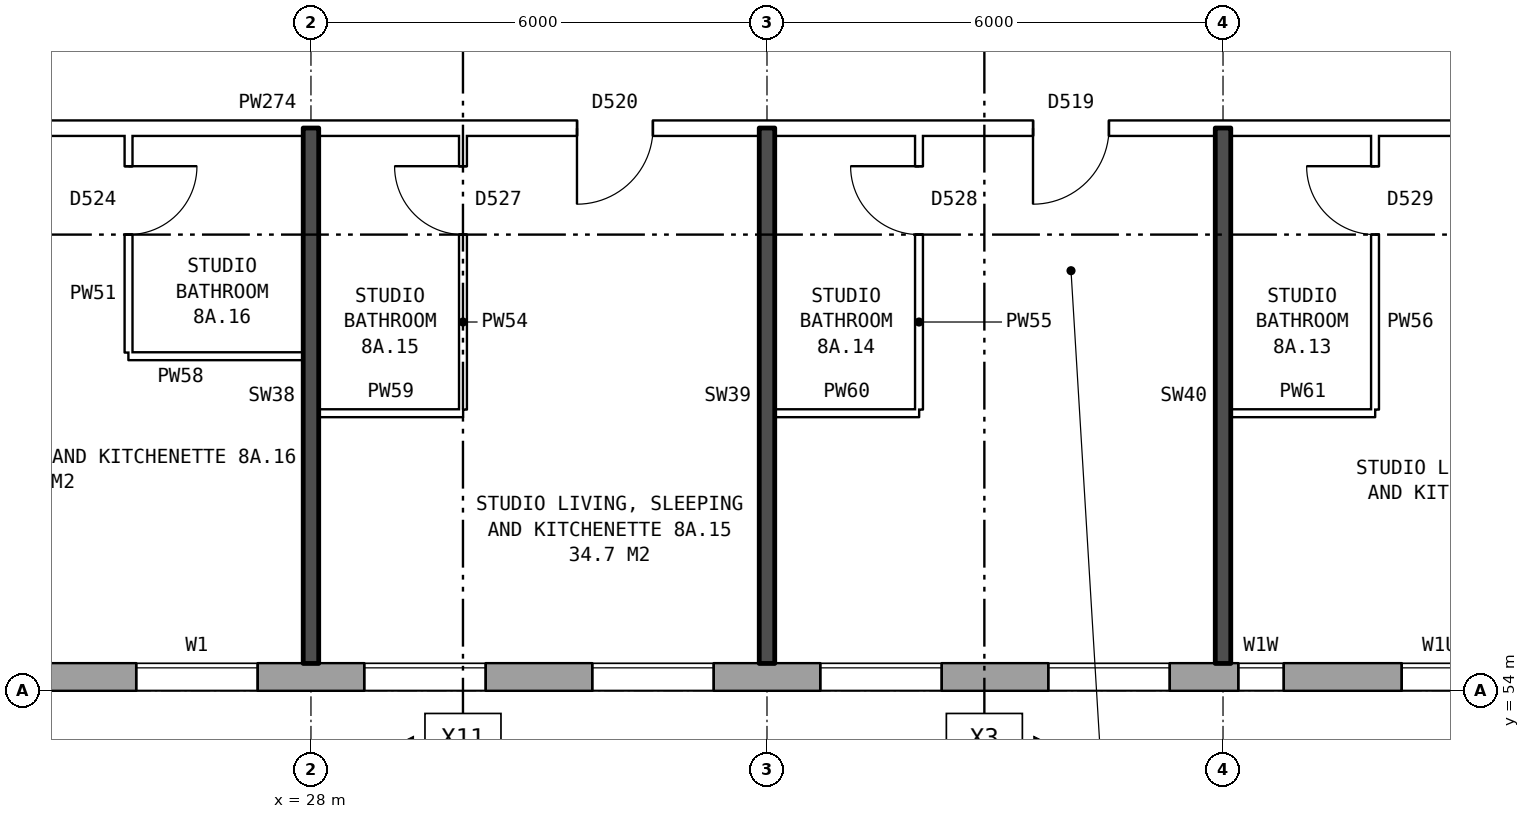
"""IFC4 building model, lengths in metres.
Left out: names, types, materials, properties, quantities, classifications, styles, units other than length and angle.
Written with IfcOpenShell. Run it as: python <this file> out.ifc"""

import sys

from ifc_helpers import new_model, si_unit, direction, frame, frame_2d, origin, place, context, subcontext, project, spatial, rectangle, extrude, element, fill, save


model = new_model("IFC4")
c1 = context("Model", 3, precision=1e-05, world=origin(), true_north=direction((0.0, 1.0)))
c2 = subcontext(c1, "Body", "Model", "MODEL_VIEW")
j1 = project(units=[si_unit("LENGTHUNIT", "METRE"), si_unit("PLANEANGLEUNIT", "RADIAN")], contexts=[c1])
p1 = place(None, origin())
s1 = spatial("IfcSite", under=j1, at=p1, CompositionType="ELEMENT")
p2 = place(p1, origin())
s2 = spatial("IfcBuilding", under=s1, at=p2, CompositionType="ELEMENT")
p3 = place(p2, frame((0.0, 0.0, 31.9)))
s3 = spatial("IfcBuildingStorey", under=s2, at=p3, CompositionType="ELEMENT", Elevation=31.9)
p4 = place(p3, frame((22.825, 54.18, 0.0), z_axis=(0.0, 0.0, 1.0), x_axis=(1.0, 0.0, 0.0)))
e1 = element("IfcWall", 1, at=p4, inside=s3, PredefinedType="STANDARD", context=c2, shape_type="SweptSolid", body=[
    extrude(rectangle(XDim=50.101, YDim=0.36, at=frame_2d((25.05, 0.0))), origin(), (0.0, 0.0, 1.0), 2.85),
])
p5 = place(p4, frame((2.875, 0.0, 0.8)))
e2 = element("IfcOpeningElement", 2, at=p5, cuts=e1, PredefinedType="OPENING", context=c2, shape_type="SweptSolid", body=[
    extrude(rectangle(XDim=1.6, YDim=1.8, at=frame_2d((0.8, 0.9))), frame((0.0, 0.19, 0.0), z_axis=(0.0, -1.0, 0.0), x_axis=(1.0, 0.0, 0.0)), (0.0, 0.0, 1.0), 0.38),
])
p6 = place(p4, frame((5.875, 0.0, 0.8)))
e3 = element("IfcOpeningElement", 3, at=p6, cuts=e1, PredefinedType="OPENING", context=c2, shape_type="SweptSolid", body=[
    extrude(rectangle(XDim=1.6, YDim=1.8, at=frame_2d((0.8, 0.9))), frame((0.0, 0.19, 0.0), z_axis=(0.0, -1.0, 0.0), x_axis=(1.0, 0.0, 0.0)), (0.0, 0.0, 1.0), 0.38),
])
p7 = place(p4, frame((8.875, 0.0, 0.8)))
e4 = element("IfcOpeningElement", 4, at=p7, cuts=e1, PredefinedType="OPENING", context=c2, shape_type="SweptSolid", body=[
    extrude(rectangle(XDim=1.6, YDim=1.8, at=frame_2d((0.8, 0.9))), frame((0.0, 0.19, 0.0), z_axis=(0.0, -1.0, 0.0), x_axis=(1.0, 0.0, 0.0)), (0.0, 0.0, 1.0), 0.38),
])
p8 = place(p4, frame((11.875, 0.0, 0.8)))
e5 = element("IfcOpeningElement", 5, at=p8, cuts=e1, PredefinedType="OPENING", context=c2, shape_type="SweptSolid", body=[
    extrude(rectangle(XDim=1.6, YDim=1.8, at=frame_2d((0.8, 0.9))), frame((0.0, 0.19, 0.0), z_axis=(0.0, -1.0, 0.0), x_axis=(1.0, 0.0, 0.0)), (0.0, 0.0, 1.0), 0.38),
])
p9 = place(p4, frame((14.875, 0.0, 0.8)))
e6 = element("IfcOpeningElement", 6, at=p9, cuts=e1, PredefinedType="OPENING", context=c2, shape_type="SweptSolid", body=[
    extrude(rectangle(XDim=1.6, YDim=1.8, at=frame_2d((0.8, 0.9))), frame((0.0, 0.19, 0.0), z_axis=(0.0, -1.0, 0.0), x_axis=(1.0, 0.0, 0.0)), (0.0, 0.0, 1.0), 0.38),
])
p10 = place(p4, frame((17.375, 0.0, 1.6)))
e7 = element("IfcOpeningElement", 7, at=p10, cuts=e1, PredefinedType="OPENING", context=c2, shape_type="SweptSolid", body=[
    extrude(rectangle(XDim=0.6, YDim=0.9, at=frame_2d((0.3, 0.45))), frame((0.0, 0.19, 0.0), z_axis=(0.0, -1.0, 0.0), x_axis=(1.0, 0.0, 0.0)), (0.0, 0.0, 1.0), 0.38),
])
p11 = place(p4, frame((20.875, 0.0, 0.8)))
e8 = element("IfcOpeningElement", 8, at=p11, cuts=e1, PredefinedType="OPENING", context=c2, shape_type="SweptSolid", body=[
    extrude(rectangle(XDim=1.6, YDim=1.8, at=frame_2d((0.8, 0.9))), frame((0.0, 0.19, 0.0), z_axis=(0.0, -1.0, 0.0), x_axis=(1.0, 0.0, 0.0)), (0.0, 0.0, 1.0), 0.38),
])
p12 = place(p4, frame((23.875, 0.0, 0.8)))
e9 = element("IfcOpeningElement", 9, at=p12, cuts=e1, PredefinedType="OPENING", context=c2, shape_type="SweptSolid", body=[
    extrude(rectangle(XDim=1.6, YDim=1.8, at=frame_2d((0.8, 0.9))), frame((0.0, 0.19, 0.0), z_axis=(0.0, -1.0, 0.0), x_axis=(1.0, 0.0, 0.0)), (0.0, 0.0, 1.0), 0.38),
])
p13 = place(p4, frame((26.875, 0.0, 0.8)))
e10 = element("IfcOpeningElement", 10, at=p13, cuts=e1, PredefinedType="OPENING", context=c2, shape_type="SweptSolid", body=[
    extrude(rectangle(XDim=1.6, YDim=1.8, at=frame_2d((0.8, 0.9))), frame((0.0, 0.19, 0.0), z_axis=(0.0, -1.0, 0.0), x_axis=(1.0, 0.0, 0.0)), (0.0, 0.0, 1.0), 0.38),
])
p14 = place(p4, frame((29.375, 0.0, 0.15)))
e11 = element("IfcOpeningElement", 11, at=p14, cuts=e1, PredefinedType="OPENING", context=c2, shape_type="SweptSolid", body=[
    extrude(rectangle(XDim=0.8, YDim=1.8, at=frame_2d((0.4, 0.9))), frame((0.0, 0.19, 0.0), z_axis=(0.0, -1.0, 0.0), x_axis=(1.0, 0.0, 0.0)), (0.0, 0.0, 1.0), 0.38),
])
p15 = place(p4, frame((32.425, 0.0, 1.4)))
e12 = element("IfcOpeningElement", 12, at=p15, cuts=e1, PredefinedType="OPENING", context=c2, shape_type="SweptSolid", body=[
    extrude(rectangle(XDim=0.6, YDim=1.2, at=frame_2d((0.3, 0.6))), frame((0.0, 0.19, 0.0), z_axis=(0.0, -1.0, 0.0), x_axis=(1.0, 0.0, 0.0)), (0.0, 0.0, 1.0), 0.38),
])
p16 = place(p4, frame((35.875, 0.0, 0.8)))
e13 = element("IfcOpeningElement", 13, at=p16, cuts=e1, PredefinedType="OPENING", context=c2, shape_type="SweptSolid", body=[
    extrude(rectangle(XDim=1.6, YDim=1.8, at=frame_2d((0.8, 0.9))), frame((0.0, 0.19, 0.0), z_axis=(0.0, -1.0, 0.0), x_axis=(1.0, 0.0, 0.0)), (0.0, 0.0, 1.0), 0.38),
])
p17 = place(p4, frame((38.875, 0.0, 0.8)))
e14 = element("IfcOpeningElement", 14, at=p17, cuts=e1, PredefinedType="OPENING", context=c2, shape_type="SweptSolid", body=[
    extrude(rectangle(XDim=1.6, YDim=1.8, at=frame_2d((0.8, 0.9))), frame((0.0, 0.19, 0.0), z_axis=(0.0, -1.0, 0.0), x_axis=(1.0, 0.0, 0.0)), (0.0, 0.0, 1.0), 0.38),
])
p18 = place(p4, frame((41.875, 0.0, 0.8)))
e15 = element("IfcOpeningElement", 15, at=p18, cuts=e1, PredefinedType="OPENING", context=c2, shape_type="SweptSolid", body=[
    extrude(rectangle(XDim=1.6, YDim=1.8, at=frame_2d((0.8, 0.9))), frame((0.0, 0.19, 0.0), z_axis=(0.0, -1.0, 0.0), x_axis=(1.0, 0.0, 0.0)), (0.0, 0.0, 1.0), 0.38),
])
p19 = place(p4, frame((44.875, 0.0, 0.8)))
e16 = element("IfcOpeningElement", 16, at=p19, cuts=e1, PredefinedType="OPENING", context=c2, shape_type="SweptSolid", body=[
    extrude(rectangle(XDim=1.6, YDim=1.8, at=frame_2d((0.8, 0.9))), frame((0.0, 0.19, 0.0), z_axis=(0.0, -1.0, 0.0), x_axis=(1.0, 0.0, 0.0)), (0.0, 0.0, 1.0), 0.38),
])
p20 = place(p4, frame((47.875, 0.0, 0.8)))
e17 = element("IfcOpeningElement", 17, at=p20, cuts=e1, PredefinedType="OPENING", context=c2, shape_type="SweptSolid", body=[
    extrude(rectangle(XDim=1.6, YDim=1.8, at=frame_2d((0.8, 0.9))), frame((0.0, 0.19, 0.0), z_axis=(0.0, -1.0, 0.0), x_axis=(1.0, 0.0, 0.0)), (0.0, 0.0, 1.0), 0.38),
])
p21 = place(p4, frame((19.525, 0.0, 0.8)))
e18 = element("IfcOpeningElement", 18, at=p21, cuts=e1, PredefinedType="OPENING", context=c2, shape_type="SweptSolid", body=[
    extrude(rectangle(XDim=1.0, YDim=0.9, at=frame_2d((0.5, 0.45))), frame((0.0, 0.19, 0.0), z_axis=(0.0, -1.0, 0.0), x_axis=(1.0, 0.0, 0.0)), (0.0, 0.0, 1.0), 0.38),
])
p22 = place(p4, frame((30.475, 0.0, 0.15)))
e19 = element("IfcOpeningElement", 19, at=p22, cuts=e1, PredefinedType="OPENING", context=c2, shape_type="SweptSolid", body=[
    extrude(rectangle(XDim=1.0, YDim=0.9, at=frame_2d((0.5, 0.45))), frame((0.0, 0.19, 0.0), z_axis=(0.0, -1.0, 0.0), x_axis=(1.0, 0.0, 0.0)), (0.0, 0.0, 1.0), 0.38),
])
p23 = place(p4, frame((33.325, 0.0, 0.8)))
e20 = element("IfcOpeningElement", 20, at=p23, cuts=e1, PredefinedType="OPENING", context=c2, shape_type="SweptSolid", body=[
    extrude(rectangle(XDim=1.6, YDim=1.8, at=frame_2d((0.8, 0.9))), frame((0.0, 0.19, 0.0), z_axis=(0.0, -1.0, 0.0), x_axis=(1.0, 0.0, 0.0)), (0.0, 0.0, 1.0), 0.38),
])
for number, where, z_axis, x_axis in (
    (21, (28.1, 57.65, 0.0), (0.0, 0.0, 1.0), (1.0, 0.0, 0.0)),
    (22, (34.1, 57.65, 0.0), (0.0, 0.0, 1.0), (1.0, 0.0, 0.0)),
    (23, (40.1, 57.65, 0.0), (0.0, 0.0, 1.0), (1.0, 0.0, 0.0)),
):
    element("IfcWall", number, at=place(p3, frame(where, z_axis=z_axis, x_axis=x_axis)), inside=s3, PredefinedType="PARTITIONING", context=c2, shape_type="SweptSolid", body=[
        extrude(rectangle(XDim=1.9, YDim=0.1, at=frame_2d((0.95, 0.0))), origin(), (0.0, 0.0, 1.0), 2.85),
    ])
p24 = place(p3, frame((25.6, 58.4, 0.0), z_axis=(0.0, 0.0, 1.0), x_axis=(1.0, 0.0, 0.0)))
e24 = element("IfcWall", 24, at=p24, inside=s3, PredefinedType="PARTITIONING", context=c2, shape_type="SweptSolid", body=[
    extrude(rectangle(XDim=2.3, YDim=0.1, at=frame_2d((1.15, 0.0))), origin(), (0.0, 0.0, 1.0), 2.85),
])
p25 = place(p3, frame((20.11, 61.4, 0.0), z_axis=(0.0, 0.0, 1.0), x_axis=(1.0, 0.0, 0.0)))
e25 = element("IfcWall", 25, at=p25, inside=s3, PredefinedType="PARTITIONING", context=c2, shape_type="SweptSolid", body=[
    extrude(rectangle(XDim=25.79, YDim=0.2, at=frame_2d((12.895, 0.0))), origin(), (0.0, 0.0, 1.0), 2.85),
])
p26 = place(p25, frame((23.34, 0.0, 0.0)))
e26 = element("IfcOpeningElement", 26, at=p26, cuts=e25, PredefinedType="OPENING", context=c2, shape_type="SweptSolid", body=[
    extrude(rectangle(XDim=1.0, YDim=2.1, at=frame_2d((0.5, 1.05))), frame((0.0, 0.11, 0.0), z_axis=(0.0, -1.0, 0.0), x_axis=(1.0, 0.0, 0.0)), (0.0, 0.0, 1.0), 0.22),
])
p27 = place(p25, frame((17.39, 0.0, 0.0)))
e27 = element("IfcOpeningElement", 27, at=p27, cuts=e25, PredefinedType="OPENING", context=c2, shape_type="SweptSolid", body=[
    extrude(rectangle(XDim=1.0, YDim=2.1, at=frame_2d((0.5, 1.05))), frame((0.0, 0.11, 0.0), z_axis=(0.0, -1.0, 0.0), x_axis=(1.0, 0.0, 0.0)), (0.0, 0.0, 1.0), 0.22),
])
p28 = place(p25, frame((11.39, 0.0, 0.0)))
e28 = element("IfcOpeningElement", 28, at=p28, cuts=e25, PredefinedType="OPENING", context=c2, shape_type="SweptSolid", body=[
    extrude(rectangle(XDim=1.0, YDim=2.1, at=frame_2d((0.5, 1.05))), frame((0.0, 0.11, 0.0), z_axis=(0.0, -1.0, 0.0), x_axis=(1.0, 0.0, 0.0)), (0.0, 0.0, 1.0), 0.22),
])
p29 = place(p25, frame((2.245, 0.0, 0.0)))
e29 = element("IfcOpeningElement", 29, at=p29, cuts=e25, PredefinedType="OPENING", context=c2, shape_type="SweptSolid", body=[
    extrude(rectangle(XDim=1.0, YDim=2.1, at=frame_2d((0.5, 1.05))), frame((0.0, 0.11, 0.0), z_axis=(0.0, -1.0, 0.0), x_axis=(1.0, 0.0, 0.0)), (0.0, 0.0, 1.0), 0.22),
])
p30 = place(p3, frame((25.6, 58.45, 0.0), z_axis=(0.0, 0.0, 1.0), x_axis=(0.0, 1.0, 0.0)))
e30 = element("IfcWall", 30, at=p30, inside=s3, PredefinedType="PARTITIONING", context=c2, shape_type="SweptSolid", body=[
    extrude(rectangle(XDim=2.85, YDim=0.1, at=frame_2d((1.425, 0.0))), origin(), (0.0, 0.0, 1.0), 2.85),
])
p31 = place(p30, frame((1.55, 0.0, 0.0)))
e31 = element("IfcOpeningElement", 31, at=p31, cuts=e30, PredefinedType="OPENING", context=c2, shape_type="SweptSolid", body=[
    extrude(rectangle(XDim=0.9, YDim=2.1, at=frame_2d((0.45, 1.05))), frame((0.0, 0.06, 0.0), z_axis=(0.0, -1.0, 0.0), x_axis=(1.0, 0.0, 0.0)), (0.0, 0.0, 1.0), 0.12),
])
p32 = place(p3, frame((28.0, 54.36, 0.0), z_axis=(0.0, 0.0, 1.0), x_axis=(0.0, 1.0, 0.0)))
e32 = element("IfcWall", 32, at=p32, inside=s3, PredefinedType="SOLIDWALL", context=c2, shape_type="SweptSolid", body=[
    extrude(rectangle(XDim=7.04, YDim=0.2, at=frame_2d((3.52, 0.0))), origin(), (0.0, 0.0, 1.0), 2.85),
])
p33 = place(p3, frame((30.0, 57.7, 0.0), z_axis=(0.0, 0.0, 1.0), x_axis=(0.0, 1.0, 0.0)))
e33 = element("IfcWall", 33, at=p33, inside=s3, PredefinedType="PARTITIONING", context=c2, shape_type="SweptSolid", body=[
    extrude(rectangle(XDim=3.6, YDim=0.1, at=frame_2d((1.8, 0.0))), origin(), (0.0, 0.0, 1.0), 2.85),
])
p34 = place(p33, frame((2.3, 0.0, 0.0)))
e34 = element("IfcOpeningElement", 34, at=p34, cuts=e33, PredefinedType="OPENING", context=c2, shape_type="SweptSolid", body=[
    extrude(rectangle(XDim=0.9, YDim=2.1, at=frame_2d((0.45, 1.05))), frame((0.0, 0.06, 0.0), z_axis=(0.0, -1.0, 0.0), x_axis=(1.0, 0.0, 0.0)), (0.0, 0.0, 1.0), 0.12),
])
p35 = place(p3, frame((34.0, 54.36, 0.0), z_axis=(0.0, 0.0, 1.0), x_axis=(0.0, 1.0, 0.0)))
e35 = element("IfcWall", 35, at=p35, inside=s3, PredefinedType="SOLIDWALL", context=c2, shape_type="SweptSolid", body=[
    extrude(rectangle(XDim=7.04, YDim=0.2, at=frame_2d((3.52, 0.0))), origin(), (0.0, 0.0, 1.0), 2.85),
])
p36 = place(p3, frame((36.0, 57.7, 0.0), z_axis=(0.0, 0.0, 1.0), x_axis=(0.0, 1.0, 0.0)))
e36 = element("IfcWall", 36, at=p36, inside=s3, PredefinedType="PARTITIONING", context=c2, shape_type="SweptSolid", body=[
    extrude(rectangle(XDim=3.6, YDim=0.1, at=frame_2d((1.8, 0.0))), origin(), (0.0, 0.0, 1.0), 2.85),
])
p37 = place(p36, frame((2.3, 0.0, 0.0)))
e37 = element("IfcOpeningElement", 37, at=p37, cuts=e36, PredefinedType="OPENING", context=c2, shape_type="SweptSolid", body=[
    extrude(rectangle(XDim=0.9, YDim=2.1, at=frame_2d((0.45, 1.05))), frame((0.0, 0.06, 0.0), z_axis=(0.0, -1.0, 0.0), x_axis=(1.0, 0.0, 0.0)), (0.0, 0.0, 1.0), 0.12),
])
p38 = place(p3, frame((40.0, 54.36, 0.0), z_axis=(0.0, 0.0, 1.0), x_axis=(0.0, 1.0, 0.0)))
e38 = element("IfcWall", 38, at=p38, inside=s3, PredefinedType="SOLIDWALL", context=c2, shape_type="SweptSolid", body=[
    extrude(rectangle(XDim=7.04, YDim=0.2, at=frame_2d((3.52, 0.0))), origin(), (0.0, 0.0, 1.0), 2.85),
])
p39 = place(p3, frame((42.0, 57.7, 0.0), z_axis=(0.0, 0.0, 1.0), x_axis=(0.0, 1.0, 0.0)))
e39 = element("IfcWall", 39, at=p39, inside=s3, PredefinedType="PARTITIONING", context=c2, shape_type="SweptSolid", body=[
    extrude(rectangle(XDim=3.6, YDim=0.1, at=frame_2d((1.8, 0.0))), origin(), (0.0, 0.0, 1.0), 2.85),
])
p40 = place(p39, frame((2.3, 0.0, 0.0)))
e40 = element("IfcOpeningElement", 40, at=p40, cuts=e39, PredefinedType="OPENING", context=c2, shape_type="SweptSolid", body=[
    extrude(rectangle(XDim=0.9, YDim=2.1, at=frame_2d((0.45, 1.05))), frame((0.0, 0.06, 0.0), z_axis=(0.0, -1.0, 0.0), x_axis=(1.0, 0.0, 0.0)), (0.0, 0.0, 1.0), 0.12),
])
p41 = place(p5, origin())
e41 = element("IfcWindow", 41, at=p41, inside=s3, PartitioningType="SINGLE_PANEL", PredefinedType="WINDOW", context=c2, shape_type="SweptSolid", body=[
    extrude(rectangle(XDim=1.6, YDim=1.8, at=frame_2d((0.8, 0.9))), frame((0.0, 0.15, 0.0), z_axis=(0.0, -1.0, 0.0), x_axis=(1.0, 0.0, 0.0)), (0.0, 0.0, 1.0), 0.06),
])
fill(e2, e41)
p42 = place(p6, origin())
e42 = element("IfcWindow", 42, at=p42, inside=s3, PartitioningType="SINGLE_PANEL", PredefinedType="WINDOW", context=c2, shape_type="SweptSolid", body=[
    extrude(rectangle(XDim=1.6, YDim=1.8, at=frame_2d((0.8, 0.9))), frame((0.0, 0.15, 0.0), z_axis=(0.0, -1.0, 0.0), x_axis=(1.0, 0.0, 0.0)), (0.0, 0.0, 1.0), 0.06),
])
fill(e3, e42)
p43 = place(p7, origin())
e43 = element("IfcWindow", 43, at=p43, inside=s3, PartitioningType="SINGLE_PANEL", PredefinedType="WINDOW", context=c2, shape_type="SweptSolid", body=[
    extrude(rectangle(XDim=1.6, YDim=1.8, at=frame_2d((0.8, 0.9))), frame((0.0, 0.15, 0.0), z_axis=(0.0, -1.0, 0.0), x_axis=(1.0, 0.0, 0.0)), (0.0, 0.0, 1.0), 0.06),
])
fill(e4, e43)
p44 = place(p8, origin())
e44 = element("IfcWindow", 44, at=p44, inside=s3, PartitioningType="SINGLE_PANEL", PredefinedType="WINDOW", context=c2, shape_type="SweptSolid", body=[
    extrude(rectangle(XDim=1.6, YDim=1.8, at=frame_2d((0.8, 0.9))), frame((0.0, 0.15, 0.0), z_axis=(0.0, -1.0, 0.0), x_axis=(1.0, 0.0, 0.0)), (0.0, 0.0, 1.0), 0.06),
])
fill(e5, e44)
p45 = place(p9, origin())
e45 = element("IfcWindow", 45, at=p45, inside=s3, PartitioningType="SINGLE_PANEL", PredefinedType="WINDOW", context=c2, shape_type="SweptSolid", body=[
    extrude(rectangle(XDim=1.6, YDim=1.8, at=frame_2d((0.8, 0.9))), frame((0.0, 0.15, 0.0), z_axis=(0.0, -1.0, 0.0), x_axis=(1.0, 0.0, 0.0)), (0.0, 0.0, 1.0), 0.06),
])
fill(e6, e45)
p46 = place(p10, origin())
e46 = element("IfcWindow", 46, at=p46, inside=s3, PartitioningType="SINGLE_PANEL", PredefinedType="WINDOW", context=c2, shape_type="SweptSolid", body=[
    extrude(rectangle(XDim=0.6, YDim=0.9, at=frame_2d((0.3, 0.45))), frame((0.0, 0.15, 0.0), z_axis=(0.0, -1.0, 0.0), x_axis=(1.0, 0.0, 0.0)), (0.0, 0.0, 1.0), 0.06),
])
fill(e7, e46)
p47 = place(p40, origin())
e47 = element("IfcDoor", 47, at=p47, inside=s3, OperationType="SINGLE_SWING_RIGHT", PredefinedType="DOOR", context=c2, shape_type="SweptSolid", body=[
    extrude(rectangle(XDim=0.9, YDim=2.1, at=frame_2d((0.45, 1.05))), frame((0.0, 0.025, 0.0), z_axis=(0.0, -1.0, 0.0), x_axis=(1.0, 0.0, 0.0)), (0.0, 0.0, 1.0), 0.05),
])
fill(e40, e47)
p48 = place(p27, frame((1.0, 0.0, 0.0), z_axis=(0.0, 0.0, 1.0), x_axis=(-1.0, 0.0, 0.0)))
e48 = element("IfcDoor", 48, at=p48, inside=s3, OperationType="SINGLE_SWING_RIGHT", PredefinedType="DOOR", context=c2, shape_type="SweptSolid", body=[
    extrude(rectangle(XDim=1.0, YDim=2.1, at=frame_2d((0.5, 1.05))), frame((0.0, 0.025, 0.0), z_axis=(0.0, -1.0, 0.0), x_axis=(1.0, 0.0, 0.0)), (0.0, 0.0, 1.0), 0.05),
])
fill(e27, e48)
p49 = place(p37, origin())
e49 = element("IfcDoor", 49, at=p49, inside=s3, OperationType="SINGLE_SWING_RIGHT", PredefinedType="DOOR", context=c2, shape_type="SweptSolid", body=[
    extrude(rectangle(XDim=0.9, YDim=2.1, at=frame_2d((0.45, 1.05))), frame((0.0, 0.025, 0.0), z_axis=(0.0, -1.0, 0.0), x_axis=(1.0, 0.0, 0.0)), (0.0, 0.0, 1.0), 0.05),
])
fill(e37, e49)
p50 = place(p28, frame((1.0, 0.0, 0.0), z_axis=(0.0, 0.0, 1.0), x_axis=(-1.0, 0.0, 0.0)))
e50 = element("IfcDoor", 50, at=p50, inside=s3, OperationType="SINGLE_SWING_RIGHT", PredefinedType="DOOR", context=c2, shape_type="SweptSolid", body=[
    extrude(rectangle(XDim=1.0, YDim=2.1, at=frame_2d((0.5, 1.05))), frame((0.0, 0.025, 0.0), z_axis=(0.0, -1.0, 0.0), x_axis=(1.0, 0.0, 0.0)), (0.0, 0.0, 1.0), 0.05),
])
fill(e28, e50)
p51 = place(p34, origin())
e51 = element("IfcDoor", 51, at=p51, inside=s3, OperationType="SINGLE_SWING_RIGHT", PredefinedType="DOOR", context=c2, shape_type="SweptSolid", body=[
    extrude(rectangle(XDim=0.9, YDim=2.1, at=frame_2d((0.45, 1.05))), frame((0.0, 0.025, 0.0), z_axis=(0.0, -1.0, 0.0), x_axis=(1.0, 0.0, 0.0)), (0.0, 0.0, 1.0), 0.05),
])
fill(e34, e51)
p52 = place(p31, frame((0.9, 0.0, 0.0), z_axis=(0.0, 0.0, 1.0), x_axis=(-1.0, 0.0, 0.0)))
e52 = element("IfcDoor", 52, at=p52, inside=s3, OperationType="SINGLE_SWING_LEFT", PredefinedType="DOOR", context=c2, shape_type="SweptSolid", body=[
    extrude(rectangle(XDim=0.9, YDim=2.1, at=frame_2d((0.45, 1.05))), frame((0.0, 0.025, 0.0), z_axis=(0.0, -1.0, 0.0), x_axis=(1.0, 0.0, 0.0)), (0.0, 0.0, 1.0), 0.05),
])
fill(e31, e52)
p53 = place(p21, origin())
e53 = element("IfcWindow", 53, at=p53, inside=s3, PartitioningType="SINGLE_PANEL", PredefinedType="WINDOW", context=c2, shape_type="SweptSolid", body=[
    extrude(rectangle(XDim=1.0, YDim=0.9, at=frame_2d((0.5, 0.45))), frame((0.0, 0.15, 0.0), z_axis=(0.0, -1.0, 0.0), x_axis=(1.0, 0.0, 0.0)), (0.0, 0.0, 1.0), 0.06),
])
fill(e18, e53)
save(model, sys.argv[1])
